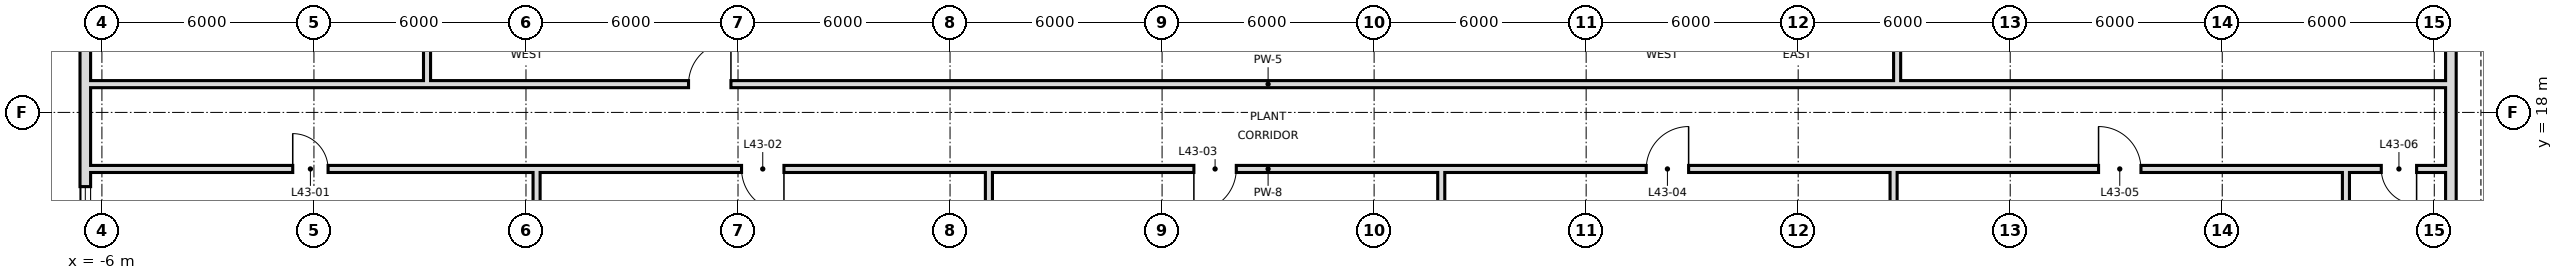
"""IFC4 building model, lengths in metres.
Left out: names, types, materials, properties, quantities, classifications, styles, units other than length and angle.
Written with IfcOpenShell. Run it as: python <this file> out.ifc"""

import sys

from ifc_helpers import new_model, si_unit, direction, frame, frame_2d, origin, place, context, subcontext, project, spatial, rectangle, extrude, element, fill, save


model = new_model("IFC4")
c1 = context("Model", 3, precision=1e-05, world=origin(), true_north=direction((0.0, 1.0)))
c2 = subcontext(c1, "Body", "Model", "MODEL_VIEW")
j1 = project(units=[si_unit("LENGTHUNIT", "METRE"), si_unit("PLANEANGLEUNIT", "RADIAN")], contexts=[c1])
p1 = place(None, origin())
s1 = spatial("IfcSite", under=j1, at=p1, CompositionType="ELEMENT")
p2 = place(p1, origin())
s2 = spatial("IfcBuilding", under=s1, at=p2, CompositionType="ELEMENT")
p3 = place(p2, frame((0.0, 0.0, 186.0)))
s3 = spatial("IfcBuildingStorey", under=s2, at=p3, CompositionType="ELEMENT", Elevation=186.0)
p4 = place(p3, frame((60.47, 5.805, 0.0), z_axis=(0.0, 0.0, 1.0), x_axis=(0.0, 1.0, 0.0)))
e1 = element("IfcWall", 1, at=p4, inside=s3, PredefinedType="SOLIDWALL", context=c2, shape_type="SweptSolid", body=[
    extrude(rectangle(XDim=36.389, YDim=0.3, at=frame_2d((18.195, 0.0))), origin(), (0.0, 0.0, 1.0), 5.7),
])
p5 = place(p4, frame((2.17, 0.0, 0.9)))
e2 = element("IfcOpeningElement", 2, at=p5, cuts=e1, PredefinedType="OPENING", context=c2, shape_type="SweptSolid", body=[
    extrude(rectangle(XDim=1.8, YDim=1.5, at=frame_2d((0.9, 0.75))), frame((0.0, 0.16, 0.0), z_axis=(0.0, -1.0, 0.0), x_axis=(1.0, 0.0, 0.0)), (0.0, 0.0, 1.0), 0.32),
])
p6 = place(p4, frame((14.295, 0.0, 0.9)))
e3 = element("IfcOpeningElement", 3, at=p6, cuts=e1, PredefinedType="OPENING", context=c2, shape_type="SweptSolid", body=[
    extrude(rectangle(XDim=1.8, YDim=1.5, at=frame_2d((0.9, 0.75))), frame((0.0, 0.16, 0.0), z_axis=(0.0, -1.0, 0.0), x_axis=(1.0, 0.0, 0.0)), (0.0, 0.0, 1.0), 0.32),
])
p7 = place(p4, frame((26.295, 0.0, 0.9)))
e4 = element("IfcOpeningElement", 4, at=p7, cuts=e1, PredefinedType="OPENING", context=c2, shape_type="SweptSolid", body=[
    extrude(rectangle(XDim=1.8, YDim=1.5, at=frame_2d((0.9, 0.75))), frame((0.0, 0.16, 0.0), z_axis=(0.0, -1.0, 0.0), x_axis=(1.0, 0.0, 0.0)), (0.0, 0.0, 1.0), 0.32),
])
p8 = place(p3, frame((-6.47, 42.195, 0.0), z_axis=(0.0, 0.0, 1.0), x_axis=(0.0, -1.0, 0.0)))
e5 = element("IfcWall", 5, at=p8, inside=s3, PredefinedType="SOLIDWALL", context=c2, shape_type="SweptSolid", body=[
    extrude(rectangle(XDim=36.389, YDim=0.3, at=frame_2d((18.195, 0.0))), origin(), (0.0, 0.0, 1.0), 5.7),
])
p9 = place(p8, frame((2.17, 0.0, 0.9)))
e6 = element("IfcOpeningElement", 6, at=p9, cuts=e5, PredefinedType="OPENING", context=c2, shape_type="SweptSolid", body=[
    extrude(rectangle(XDim=1.8, YDim=1.5, at=frame_2d((0.9, 0.75))), frame((0.0, 0.16, 0.0), z_axis=(0.0, -1.0, 0.0), x_axis=(1.0, 0.0, 0.0)), (0.0, 0.0, 1.0), 0.32),
])
p10 = place(p8, frame((14.295, 0.0, 0.9)))
e7 = element("IfcOpeningElement", 7, at=p10, cuts=e5, PredefinedType="OPENING", context=c2, shape_type="SweptSolid", body=[
    extrude(rectangle(XDim=1.8, YDim=1.5, at=frame_2d((0.9, 0.75))), frame((0.0, 0.16, 0.0), z_axis=(0.0, -1.0, 0.0), x_axis=(1.0, 0.0, 0.0)), (0.0, 0.0, 1.0), 0.32),
])
p11 = place(p8, frame((26.295, 0.0, 0.9)))
e8 = element("IfcOpeningElement", 8, at=p11, cuts=e5, PredefinedType="OPENING", context=c2, shape_type="SweptSolid", body=[
    extrude(rectangle(XDim=1.8, YDim=1.5, at=frame_2d((0.9, 0.75))), frame((0.0, 0.16, 0.0), z_axis=(0.0, -1.0, 0.0), x_axis=(1.0, 0.0, 0.0)), (0.0, 0.0, 1.0), 0.32),
])
p12 = place(p3, frame((3.2, 18.9, 0.0), z_axis=(0.0, 0.0, 1.0), x_axis=(0.0, 1.0, 0.0)))
e9 = element("IfcWall", 9, at=p12, inside=s3, PredefinedType="SOLIDWALL", context=c2, shape_type="SweptSolid", body=[
    extrude(rectangle(XDim=29.7, YDim=0.2, at=frame_2d((14.85, 0.0))), origin(), (0.0, 0.0, 1.0), 5.25),
])
p13 = place(p12, frame((18.3, 0.0, 0.0)))
e10 = element("IfcOpeningElement", 10, at=p13, cuts=e9, PredefinedType="OPENING", context=c2, shape_type="SweptSolid", body=[
    extrude(rectangle(XDim=1.2, YDim=2.4, at=frame_2d((0.6, 1.2))), frame((0.0, 0.11, 0.0), z_axis=(0.0, -1.0, 0.0), x_axis=(1.0, 0.0, 0.0)), (0.0, 0.0, 1.0), 0.22),
])
for number, where, z_axis, x_axis in (
    (11, (6.3, -0.6, 0.0), (0.0, 0.0, 1.0), (0.0, 1.0, 0.0)),
    (12, (19.1, -0.6, 0.0), (0.0, 0.0, 1.0), (0.0, 1.0, 0.0)),
    (13, (31.9, -0.6, 0.0), (0.0, 0.0, 1.0), (0.0, 1.0, 0.0)),
    (14, (44.7, -0.6, 0.0), (0.0, 0.0, 1.0), (0.0, 1.0, 0.0)),
):
    element("IfcWall", number, at=place(p3, frame(where, z_axis=z_axis, x_axis=x_axis)), inside=s3, PredefinedType="SOLIDWALL", context=c2, shape_type="SweptSolid", body=[
        extrude(rectangle(XDim=16.9, YDim=0.2, at=frame_2d((8.45, 0.0))), origin(), (0.0, 0.0, 1.0), 5.7),
    ])
p14 = place(p3, frame((44.8, 18.9, 0.0), z_axis=(0.0, 0.0, 1.0), x_axis=(0.0, 1.0, 0.0)))
e15 = element("IfcWall", 15, at=p14, inside=s3, PredefinedType="SOLIDWALL", context=c2, shape_type="SweptSolid", body=[
    extrude(rectangle(XDim=29.7, YDim=0.2, at=frame_2d((14.85, 0.0))), origin(), (0.0, 0.0, 1.0), 5.25),
])
p15 = place(p14, frame((18.3, 0.0, 0.0)))
e16 = element("IfcOpeningElement", 16, at=p15, cuts=e15, PredefinedType="OPENING", context=c2, shape_type="SweptSolid", body=[
    extrude(rectangle(XDim=1.2, YDim=2.4, at=frame_2d((0.6, 1.2))), frame((0.0, 0.11, 0.0), z_axis=(0.0, -1.0, 0.0), x_axis=(1.0, 0.0, 0.0)), (0.0, 0.0, 1.0), 0.22),
])
p16 = place(p3, frame((57.5, 2.651, 0.0), z_axis=(0.0, 0.0, 1.0), x_axis=(0.0, 1.0, 0.0)))
e17 = element("IfcWall", 17, at=p16, inside=s3, PredefinedType="SOLIDWALL", context=c2, shape_type="SweptSolid", body=[
    extrude(rectangle(XDim=13.649, YDim=0.2, at=frame_2d((6.825, 0.0))), origin(), (0.0, 0.0, 1.0), 5.7),
])
p17 = place(p3, frame((-6.6, 16.4, 0.0), z_axis=(0.0, 0.0, 1.0), x_axis=(1.0, 0.0, 0.0)))
e18 = element("IfcWall", 18, at=p17, inside=s3, PredefinedType="SOLIDWALL", context=c2, shape_type="SweptSolid", body=[
    extrude(rectangle(XDim=67.2, YDim=0.2, at=frame_2d((33.6, 0.0))), origin(), (0.0, 0.0, 1.0), 5.0),
])
p18 = place(p17, frame((6.0, 0.0, 0.0)))
e19 = element("IfcOpeningElement", 19, at=p18, cuts=e18, PredefinedType="OPENING", context=c2, shape_type="SweptSolid", body=[
    extrude(rectangle(XDim=1.0, YDim=2.4, at=frame_2d((0.5, 1.2))), frame((0.0, 0.11, 0.0), z_axis=(0.0, -1.0, 0.0), x_axis=(1.0, 0.0, 0.0)), (0.0, 0.0, 1.0), 0.22),
])
p19 = place(p17, frame((18.7, 0.0, 0.0)))
e20 = element("IfcOpeningElement", 20, at=p19, cuts=e18, PredefinedType="OPENING", context=c2, shape_type="SweptSolid", body=[
    extrude(rectangle(XDim=1.2, YDim=2.4, at=frame_2d((0.6, 1.2))), frame((0.0, 0.11, 0.0), z_axis=(0.0, -1.0, 0.0), x_axis=(1.0, 0.0, 0.0)), (0.0, 0.0, 1.0), 0.22),
])
p20 = place(p17, frame((31.5, 0.0, 0.0)))
e21 = element("IfcOpeningElement", 21, at=p20, cuts=e18, PredefinedType="OPENING", context=c2, shape_type="SweptSolid", body=[
    extrude(rectangle(XDim=1.2, YDim=2.4, at=frame_2d((0.6, 1.2))), frame((0.0, 0.11, 0.0), z_axis=(0.0, -1.0, 0.0), x_axis=(1.0, 0.0, 0.0)), (0.0, 0.0, 1.0), 0.22),
])
p21 = place(p17, frame((44.3, 0.0, 0.0)))
e22 = element("IfcOpeningElement", 22, at=p21, cuts=e18, PredefinedType="OPENING", context=c2, shape_type="SweptSolid", body=[
    extrude(rectangle(XDim=1.2, YDim=2.4, at=frame_2d((0.6, 1.2))), frame((0.0, 0.11, 0.0), z_axis=(0.0, -1.0, 0.0), x_axis=(1.0, 0.0, 0.0)), (0.0, 0.0, 1.0), 0.22),
])
p22 = place(p17, frame((57.1, 0.0, 0.0)))
e23 = element("IfcOpeningElement", 23, at=p22, cuts=e18, PredefinedType="OPENING", context=c2, shape_type="SweptSolid", body=[
    extrude(rectangle(XDim=1.2, YDim=2.4, at=frame_2d((0.6, 1.2))), frame((0.0, 0.11, 0.0), z_axis=(0.0, -1.0, 0.0), x_axis=(1.0, 0.0, 0.0)), (0.0, 0.0, 1.0), 0.22),
])
p23 = place(p17, frame((65.1, 0.0, 0.0)))
e24 = element("IfcOpeningElement", 24, at=p23, cuts=e18, PredefinedType="OPENING", context=c2, shape_type="SweptSolid", body=[
    extrude(rectangle(XDim=1.0, YDim=2.4, at=frame_2d((0.5, 1.2))), frame((0.0, 0.11, 0.0), z_axis=(0.0, -1.0, 0.0), x_axis=(1.0, 0.0, 0.0)), (0.0, 0.0, 1.0), 0.22),
])
p24 = place(p3, frame((-6.6, 18.8, 0.0), z_axis=(0.0, 0.0, 1.0), x_axis=(1.0, 0.0, 0.0)))
e25 = element("IfcWall", 25, at=p24, inside=s3, PredefinedType="SOLIDWALL", context=c2, shape_type="SweptSolid", body=[
    extrude(rectangle(XDim=67.2, YDim=0.2, at=frame_2d((33.6, 0.0))), origin(), (0.0, 0.0, 1.0), 5.0),
])
p25 = place(p24, frame((17.2, 0.0, 0.0)))
e26 = element("IfcOpeningElement", 26, at=p25, cuts=e25, PredefinedType="OPENING", context=c2, shape_type="SweptSolid", body=[
    extrude(rectangle(XDim=1.2, YDim=2.4, at=frame_2d((0.6, 1.2))), frame((0.0, 0.11, 0.0), z_axis=(0.0, -1.0, 0.0), x_axis=(1.0, 0.0, 0.0)), (0.0, 0.0, 1.0), 0.22),
])
p26 = place(p11, origin())
e27 = element("IfcWindow", 27, at=p26, inside=s3, PartitioningType="SINGLE_PANEL", PredefinedType="WINDOW", context=c2, shape_type="SweptSolid", body=[
    extrude(rectangle(XDim=1.8, YDim=1.5, at=frame_2d((0.9, 0.75))), frame((0.0, 0.03, 0.0), z_axis=(0.0, -1.0, 0.0), x_axis=(1.0, 0.0, 0.0)), (0.0, 0.0, 1.0), 0.06),
])
fill(e8, e27)
p27 = place(p18, origin())
e28 = element("IfcDoor", 28, at=p27, inside=s3, OperationType="SINGLE_SWING_LEFT", PredefinedType="DOOR", context=c2, shape_type="SweptSolid", body=[
    extrude(rectangle(XDim=1.0, YDim=2.4, at=frame_2d((0.5, 1.2))), frame((0.0, 0.025, 0.0), z_axis=(0.0, -1.0, 0.0), x_axis=(1.0, 0.0, 0.0)), (0.0, 0.0, 1.0), 0.05),
])
fill(e19, e28)
p28 = place(p19, origin())
e29 = element("IfcDoor", 29, at=p28, inside=s3, OperationType="SINGLE_SWING_RIGHT", PredefinedType="DOOR", context=c2, shape_type="SweptSolid", body=[
    extrude(rectangle(XDim=1.2, YDim=2.4, at=frame_2d((0.6, 1.2))), frame((0.0, 0.025, 0.0), z_axis=(0.0, -1.0, 0.0), x_axis=(1.0, 0.0, 0.0)), (0.0, 0.0, 1.0), 0.05),
])
fill(e20, e29)
p29 = place(p20, frame((1.2, 0.0, 0.0), z_axis=(0.0, 0.0, 1.0), x_axis=(-1.0, 0.0, 0.0)))
e30 = element("IfcDoor", 30, at=p29, inside=s3, OperationType="SINGLE_SWING_RIGHT", PredefinedType="DOOR", context=c2, shape_type="SweptSolid", body=[
    extrude(rectangle(XDim=1.2, YDim=2.4, at=frame_2d((0.6, 1.2))), frame((0.0, 0.025, 0.0), z_axis=(0.0, -1.0, 0.0), x_axis=(1.0, 0.0, 0.0)), (0.0, 0.0, 1.0), 0.05),
])
fill(e21, e30)
p30 = place(p21, frame((1.2, 0.0, 0.0), z_axis=(0.0, 0.0, 1.0), x_axis=(-1.0, 0.0, 0.0)))
e31 = element("IfcDoor", 31, at=p30, inside=s3, OperationType="SINGLE_SWING_LEFT", PredefinedType="DOOR", context=c2, shape_type="SweptSolid", body=[
    extrude(rectangle(XDim=1.2, YDim=2.4, at=frame_2d((0.6, 1.2))), frame((0.0, 0.025, 0.0), z_axis=(0.0, -1.0, 0.0), x_axis=(1.0, 0.0, 0.0)), (0.0, 0.0, 1.0), 0.05),
])
fill(e22, e31)
p31 = place(p22, origin())
e32 = element("IfcDoor", 32, at=p31, inside=s3, OperationType="SINGLE_SWING_LEFT", PredefinedType="DOOR", context=c2, shape_type="SweptSolid", body=[
    extrude(rectangle(XDim=1.2, YDim=2.4, at=frame_2d((0.6, 1.2))), frame((0.0, 0.025, 0.0), z_axis=(0.0, -1.0, 0.0), x_axis=(1.0, 0.0, 0.0)), (0.0, 0.0, 1.0), 0.05),
])
fill(e23, e32)
p32 = place(p23, origin())
e33 = element("IfcDoor", 33, at=p32, inside=s3, OperationType="SINGLE_SWING_RIGHT", PredefinedType="DOOR", context=c2, shape_type="SweptSolid", body=[
    extrude(rectangle(XDim=1.0, YDim=2.4, at=frame_2d((0.5, 1.2))), frame((0.0, 0.025, 0.0), z_axis=(0.0, -1.0, 0.0), x_axis=(1.0, 0.0, 0.0)), (0.0, 0.0, 1.0), 0.05),
])
fill(e24, e33)
p33 = place(p25, frame((1.2, 0.0, 0.0), z_axis=(0.0, 0.0, 1.0), x_axis=(-1.0, 0.0, 0.0)))
e34 = element("IfcDoor", 34, at=p33, inside=s3, OperationType="SINGLE_SWING_LEFT", PredefinedType="DOOR", context=c2, shape_type="SweptSolid", body=[
    extrude(rectangle(XDim=1.2, YDim=2.4, at=frame_2d((0.6, 1.2))), frame((0.0, 0.025, 0.0), z_axis=(0.0, -1.0, 0.0), x_axis=(1.0, 0.0, 0.0)), (0.0, 0.0, 1.0), 0.05),
])
fill(e26, e34)
save(model, sys.argv[1])
